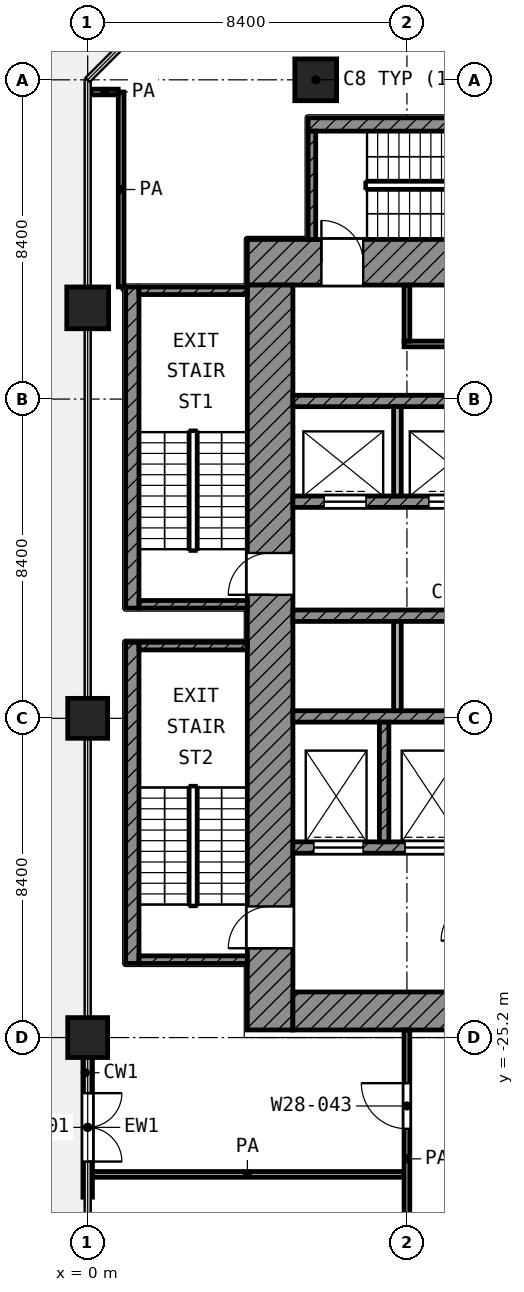
"""IFC4 building model, lengths in metres.
Left out: names, types, materials, properties, quantities, classifications, styles, units other than length and angle.
Written with IfcOpenShell. Run it as: python <this file> out.ifc"""

import sys

from ifc_helpers import new_model, si_unit, direction, frame, frame_2d, origin, origin_2d, place, context, subcontext, project, spatial, rectangle, extrude, element, fill, save


model = new_model("IFC4")
c1 = context("Model", 3, precision=1e-05, world=origin(), true_north=direction((0.0, 1.0)))
c2 = subcontext(c1, "Body", "Model", "MODEL_VIEW")
j1 = project(units=[si_unit("LENGTHUNIT", "METRE"), si_unit("PLANEANGLEUNIT", "RADIAN")], contexts=[c1])
p1 = place(None, origin())
s1 = spatial("IfcSite", under=j1, at=p1, CompositionType="ELEMENT")
p2 = place(p1, origin())
s2 = spatial("IfcBuilding", under=s1, at=p2, CompositionType="ELEMENT")
p3 = place(p2, frame((0.0, 0.0, 124.0)))
s3 = spatial("IfcBuildingStorey", under=s2, at=p3, CompositionType="ELEMENT", Elevation=124.0)
for number, where, z_axis, x_axis in (
    (1, (6.0, 0.0, 0.0), (0.0, 0.0, 1.0), (1.0, 0.0, 0.0)),
    (2, (0.0, -6.0, 0.0), (0.0, 0.0, 1.0), (1.0, 0.0, 0.0)),
):
    element("IfcColumn", number, at=place(p3, frame(where, z_axis=z_axis, x_axis=x_axis)), inside=s3, PredefinedType="COLUMN", context=c2, shape_type="SweptSolid", body=[
        extrude(rectangle(XDim=1.1, YDim=1.1, at=origin_2d()), origin(), (0.0, 0.0, 1.0), 4.2),
    ])
for number, where, z_axis, x_axis in (
    (3, (0.0, -16.8, 0.0), (0.0, 0.0, 1.0), (1.0, 0.0, 0.0)),
    (4, (0.0, -25.2, 0.0), (0.0, 0.0, 1.0), (1.0, 0.0, 0.0)),
):
    element("IfcColumn", number, at=place(p3, frame(where, z_axis=z_axis, x_axis=x_axis)), inside=s3, PredefinedType="COLUMN", context=c2, shape_type="SweptSolid", body=[
        extrude(rectangle(XDim=1.05, YDim=1.05, at=origin_2d()), origin(), (0.0, 0.0, 1.0), 4.2),
    ])
p4 = place(p3, frame((0.0, -25.725, 0.0), z_axis=(0.0, 0.0, 1.0), x_axis=(0.0, -1.0, 0.0)))
e5 = element("IfcWall", 5, at=p4, inside=s3, PredefinedType="SOLIDWALL", context=c2, shape_type="SweptSolid", body=[
    extrude(rectangle(XDim=3.675, YDim=0.25, at=frame_2d((1.837, 0.0))), origin(), (0.0, 0.0, 1.0), 3.48),
])
p5 = place(p4, frame((0.938, 0.0, 0.0)))
e6 = element("IfcOpeningElement", 6, at=p5, cuts=e5, PredefinedType="OPENING", context=c2, shape_type="SweptSolid", body=[
    extrude(rectangle(XDim=1.8, YDim=2.1, at=frame_2d((0.9, 1.05))), frame((0.0, 0.135, 0.0), z_axis=(0.0, -1.0, 0.0), x_axis=(1.0, 0.0, 0.0)), (0.0, 0.0, 1.0), 0.27),
])
p6 = place(p3, frame((4.2, -4.8, 0.0), z_axis=(0.0, 0.0, 1.0), x_axis=(1.0, 0.0, 0.0)))
e7 = element("IfcWall", 7, at=p6, inside=s3, PredefinedType="SHEAR", context=c2, shape_type="SweptSolid", body=[
    extrude(rectangle(XDim=20.8, YDim=1.2, at=frame_2d((10.4, 0.0))), origin(), (0.0, 0.0, 1.0), 3.6),
])
p7 = place(p6, frame((1.95, 0.0, 0.0)))
e8 = element("IfcOpeningElement", 8, at=p7, cuts=e7, PredefinedType="OPENING", context=c2, shape_type="SweptSolid", body=[
    extrude(rectangle(XDim=1.1, YDim=2.1, at=frame_2d((0.55, 1.05))), frame((0.0, 0.61, 0.0), z_axis=(0.0, -1.0, 0.0), x_axis=(1.0, 0.0, 0.0)), (0.0, 0.0, 1.0), 1.22),
])
p8 = place(p6, frame((17.95, 0.0, 0.0)))
e9 = element("IfcOpeningElement", 9, at=p8, cuts=e7, PredefinedType="OPENING", context=c2, shape_type="SweptSolid", body=[
    extrude(rectangle(XDim=1.1, YDim=2.1, at=frame_2d((0.55, 1.05))), frame((0.0, 0.61, 0.0), z_axis=(0.0, -1.0, 0.0), x_axis=(1.0, 0.0, 0.0)), (0.0, 0.0, 1.0), 1.22),
])
p9 = place(p3, frame((4.8, -25.0, 0.0), z_axis=(0.0, 0.0, 1.0), x_axis=(0.0, 1.0, 0.0)))
e10 = element("IfcWall", 10, at=p9, inside=s3, PredefinedType="SHEAR", context=c2, shape_type="SweptSolid", body=[
    extrude(rectangle(XDim=19.6, YDim=1.2, at=frame_2d((9.8, 0.0))), origin(), (0.0, 0.0, 1.0), 3.6),
])
p10 = place(p9, frame((11.45, 0.0, 0.0)))
e11 = element("IfcOpeningElement", 11, at=p10, cuts=e10, PredefinedType="OPENING", context=c2, shape_type="SweptSolid", body=[
    extrude(rectangle(XDim=1.1, YDim=2.1, at=frame_2d((0.55, 1.05))), frame((0.0, 0.61, 0.0), z_axis=(0.0, -1.0, 0.0), x_axis=(1.0, 0.0, 0.0)), (0.0, 0.0, 1.0), 1.22),
])
p11 = place(p9, frame((2.15, 0.0, 0.0)))
e12 = element("IfcOpeningElement", 12, at=p11, cuts=e10, PredefinedType="OPENING", context=c2, shape_type="SweptSolid", body=[
    extrude(rectangle(XDim=1.1, YDim=2.1, at=frame_2d((0.55, 1.05))), frame((0.0, 0.61, 0.0), z_axis=(0.0, -1.0, 0.0), x_axis=(1.0, 0.0, 0.0)), (0.0, 0.0, 1.0), 1.22),
])
p12 = place(p3, frame((5.4, -24.5, 0.0), z_axis=(0.0, 0.0, 1.0), x_axis=(1.0, 0.0, 0.0)))
e13 = element("IfcWall", 13, at=p12, inside=s3, PredefinedType="SHEAR", context=c2, shape_type="SweptSolid", body=[
    extrude(rectangle(XDim=18.6, YDim=1.0, at=frame_2d((9.3, 0.0))), origin(), (0.0, 0.0, 1.0), 3.6),
])
p13 = place(p12, frame((6.3, 0.0, 0.0)))
e14 = element("IfcOpeningElement", 14, at=p13, cuts=e13, PredefinedType="OPENING", context=c2, shape_type="SweptSolid", body=[
    extrude(rectangle(XDim=1.8, YDim=2.1, at=frame_2d((0.9, 1.05))), frame((0.0, 0.51, 0.0), z_axis=(0.0, -1.0, 0.0), x_axis=(1.0, 0.0, 0.0)), (0.0, 0.0, 1.0), 1.02),
])
p14 = place(p3, frame((5.4, -8.45, 0.0), z_axis=(0.0, 0.0, 1.0), x_axis=(1.0, 0.0, 0.0)))
e15 = element("IfcWall", 15, at=p14, inside=s3, PredefinedType="SHEAR", context=c2, shape_type="SweptSolid", body=[
    extrude(rectangle(XDim=16.65, YDim=0.3, at=frame_2d((8.325, 0.0))), origin(), (0.0, 0.0, 1.0), 3.6),
])
p15 = place(p3, frame((5.4, -11.1, 0.0), z_axis=(0.0, 0.0, 1.0), x_axis=(1.0, 0.0, 0.0)))
e16 = element("IfcWall", 16, at=p15, inside=s3, PredefinedType="SHEAR", context=c2, shape_type="SweptSolid", body=[
    extrude(rectangle(XDim=16.65, YDim=0.3, at=frame_2d((8.325, 0.0))), origin(), (0.0, 0.0, 1.0), 3.6),
])
p16 = place(p15, frame((0.825, 0.0, 0.0)))
e17 = element("IfcOpeningElement", 17, at=p16, cuts=e16, PredefinedType="OPENING", context=c2, shape_type="SweptSolid", body=[
    extrude(rectangle(XDim=1.1, YDim=2.1, at=frame_2d((0.55, 1.05))), frame((0.0, 0.16, 0.0), z_axis=(0.0, -1.0, 0.0), x_axis=(1.0, 0.0, 0.0)), (0.0, 0.0, 1.0), 0.32),
])
p17 = place(p15, frame((3.575, 0.0, 0.0)))
e18 = element("IfcOpeningElement", 18, at=p17, cuts=e16, PredefinedType="OPENING", context=c2, shape_type="SweptSolid", body=[
    extrude(rectangle(XDim=1.1, YDim=2.1, at=frame_2d((0.55, 1.05))), frame((0.0, 0.16, 0.0), z_axis=(0.0, -1.0, 0.0), x_axis=(1.0, 0.0, 0.0)), (0.0, 0.0, 1.0), 0.32),
])
p18 = place(p15, frame((6.325, 0.0, 0.0)))
e19 = element("IfcOpeningElement", 19, at=p18, cuts=e16, PredefinedType="OPENING", context=c2, shape_type="SweptSolid", body=[
    extrude(rectangle(XDim=1.1, YDim=2.1, at=frame_2d((0.55, 1.05))), frame((0.0, 0.16, 0.0), z_axis=(0.0, -1.0, 0.0), x_axis=(1.0, 0.0, 0.0)), (0.0, 0.0, 1.0), 0.32),
])
p19 = place(p15, frame((9.075, 0.0, 0.0)))
e20 = element("IfcOpeningElement", 20, at=p19, cuts=e16, PredefinedType="OPENING", context=c2, shape_type="SweptSolid", body=[
    extrude(rectangle(XDim=1.1, YDim=2.1, at=frame_2d((0.55, 1.05))), frame((0.0, 0.16, 0.0), z_axis=(0.0, -1.0, 0.0), x_axis=(1.0, 0.0, 0.0)), (0.0, 0.0, 1.0), 0.32),
])
for number, where, z_axis, x_axis in (
    (21, (5.4, -14.1, 0.0), (0.0, 0.0, 1.0), (1.0, 0.0, 0.0)),
    (22, (5.4, -16.75, 0.0), (0.0, 0.0, 1.0), (1.0, 0.0, 0.0)),
):
    element("IfcWall", number, at=place(p3, frame(where, z_axis=z_axis, x_axis=x_axis)), inside=s3, PredefinedType="SHEAR", context=c2, shape_type="SweptSolid", body=[
        extrude(rectangle(XDim=16.65, YDim=0.3, at=frame_2d((8.325, 0.0))), origin(), (0.0, 0.0, 1.0), 3.6),
    ])
p20 = place(p3, frame((5.4, -20.2, 0.0), z_axis=(0.0, 0.0, 1.0), x_axis=(1.0, 0.0, 0.0)))
e23 = element("IfcWall", 23, at=p20, inside=s3, PredefinedType="SHEAR", context=c2, shape_type="SweptSolid", body=[
    extrude(rectangle(XDim=14.65, YDim=0.3, at=frame_2d((7.325, 0.0))), origin(), (0.0, 0.0, 1.0), 3.6),
])
p21 = place(p20, frame((10.55, 0.0, 0.0)))
e24 = element("IfcOpeningElement", 24, at=p21, cuts=e23, PredefinedType="OPENING", context=c2, shape_type="SweptSolid", body=[
    extrude(rectangle(XDim=1.3, YDim=2.1, at=frame_2d((0.65, 1.05))), frame((0.0, 0.16, 0.0), z_axis=(0.0, -1.0, 0.0), x_axis=(1.0, 0.0, 0.0)), (0.0, 0.0, 1.0), 0.32),
])
p22 = place(p20, frame((12.95, 0.0, 0.0)))
e25 = element("IfcOpeningElement", 25, at=p22, cuts=e23, PredefinedType="OPENING", context=c2, shape_type="SweptSolid", body=[
    extrude(rectangle(XDim=1.3, YDim=2.1, at=frame_2d((0.65, 1.05))), frame((0.0, 0.16, 0.0), z_axis=(0.0, -1.0, 0.0), x_axis=(1.0, 0.0, 0.0)), (0.0, 0.0, 1.0), 0.32),
])
p23 = place(p20, frame((0.55, 0.0, 0.0)))
e26 = element("IfcOpeningElement", 26, at=p23, cuts=e23, PredefinedType="OPENING", context=c2, shape_type="SweptSolid", body=[
    extrude(rectangle(XDim=1.3, YDim=2.1, at=frame_2d((0.65, 1.05))), frame((0.0, 0.16, 0.0), z_axis=(0.0, -1.0, 0.0), x_axis=(1.0, 0.0, 0.0)), (0.0, 0.0, 1.0), 0.32),
])
p24 = place(p20, frame((2.95, 0.0, 0.0)))
e27 = element("IfcOpeningElement", 27, at=p24, cuts=e23, PredefinedType="OPENING", context=c2, shape_type="SweptSolid", body=[
    extrude(rectangle(XDim=1.3, YDim=2.1, at=frame_2d((0.65, 1.05))), frame((0.0, 0.16, 0.0), z_axis=(0.0, -1.0, 0.0), x_axis=(1.0, 0.0, 0.0)), (0.0, 0.0, 1.0), 0.32),
])
p25 = place(p20, frame((7.15, 0.0, 0.0)))
e28 = element("IfcOpeningElement", 28, at=p25, cuts=e23, PredefinedType="OPENING", context=c2, shape_type="SweptSolid", body=[
    extrude(rectangle(XDim=0.9, YDim=2.1, at=frame_2d((0.45, 1.05))), frame((0.0, 0.16, 0.0), z_axis=(0.0, -1.0, 0.0), x_axis=(1.0, 0.0, 0.0)), (0.0, 0.0, 1.0), 0.32),
])
p26 = place(p3, frame((7.8, -20.05, 0.0), z_axis=(0.0, 0.0, 1.0), x_axis=(0.0, 1.0, 0.0)))
e29 = element("IfcWall", 29, at=p26, inside=s3, PredefinedType="SHEAR", context=c2, shape_type="SweptSolid", body=[
    extrude(rectangle(XDim=3.15, YDim=0.25, at=frame_2d((1.575, 0.0))), origin(), (0.0, 0.0, 1.0), 3.6),
])
p27 = place(p3, frame((8.15, -10.95, 0.0), z_axis=(0.0, 0.0, 1.0), x_axis=(0.0, 1.0, 0.0)))
e30 = element("IfcWall", 30, at=p27, inside=s3, PredefinedType="PARTITIONING", context=c2, shape_type="SweptSolid", body=[
    extrude(rectangle(XDim=2.35, YDim=0.2, at=frame_2d((1.175, 0.0))), origin(), (0.0, 0.0, 1.0), 3.6),
])
p28 = place(p3, frame((8.15, -16.6, 0.0), z_axis=(0.0, 0.0, 1.0), x_axis=(0.0, 1.0, 0.0)))
e31 = element("IfcWall", 31, at=p28, inside=s3, PredefinedType="PARTITIONING", context=c2, shape_type="SweptSolid", body=[
    extrude(rectangle(XDim=2.35, YDim=0.2, at=frame_2d((1.175, 0.0))), origin(), (0.0, 0.0, 1.0), 3.6),
])
p29 = place(p3, frame((8.325, -6.95, 0.0), z_axis=(0.0, 0.0, 1.0), x_axis=(1.0, 0.0, 0.0)))
e32 = element("IfcWall", 32, at=p29, inside=s3, PredefinedType="PARTITIONING", context=c2, shape_type="SweptSolid", body=[
    extrude(rectangle(XDim=12.75, YDim=0.15, at=frame_2d((6.375, 0.0))), origin(), (0.0, 0.0, 1.0), 3.6),
])
p30 = place(p29, frame((1.725, 0.0, 0.0)))
e33 = element("IfcOpeningElement", 33, at=p30, cuts=e32, PredefinedType="OPENING", context=c2, shape_type="SweptSolid", body=[
    extrude(rectangle(XDim=0.9, YDim=2.1, at=frame_2d((0.45, 1.05))), frame((0.0, 0.085, 0.0), z_axis=(0.0, -1.0, 0.0), x_axis=(1.0, 0.0, 0.0)), (0.0, 0.0, 1.0), 0.17),
])
p31 = place(p29, frame((5.925, 0.0, 0.0)))
e34 = element("IfcOpeningElement", 34, at=p31, cuts=e32, PredefinedType="OPENING", context=c2, shape_type="SweptSolid", body=[
    extrude(rectangle(XDim=0.9, YDim=2.1, at=frame_2d((0.45, 1.05))), frame((0.0, 0.085, 0.0), z_axis=(0.0, -1.0, 0.0), x_axis=(1.0, 0.0, 0.0)), (0.0, 0.0, 1.0), 0.17),
])
p32 = place(p29, frame((10.125, 0.0, 0.0)))
e35 = element("IfcOpeningElement", 35, at=p32, cuts=e32, PredefinedType="OPENING", context=c2, shape_type="SweptSolid", body=[
    extrude(rectangle(XDim=0.9, YDim=2.1, at=frame_2d((0.45, 1.05))), frame((0.0, 0.085, 0.0), z_axis=(0.0, -1.0, 0.0), x_axis=(1.0, 0.0, 0.0)), (0.0, 0.0, 1.0), 0.17),
])
p33 = place(p3, frame((8.4, -6.875, 0.0), z_axis=(0.0, 0.0, 1.0), x_axis=(0.0, 1.0, 0.0)))
e36 = element("IfcWall", 36, at=p33, inside=s3, PredefinedType="PARTITIONING", context=c2, shape_type="SweptSolid", body=[
    extrude(rectangle(XDim=1.475, YDim=0.15, at=frame_2d((0.738, 0.0))), origin(), (0.0, 0.0, 1.0), 3.6),
])
p34 = place(p3, frame((1.175, -13.9, 0.0), z_axis=(0.0, 0.0, 1.0), x_axis=(0.0, 1.0, 0.0)))
e37 = element("IfcWall", 37, at=p34, inside=s3, PredefinedType="SHEAR", context=c2, shape_type="SweptSolid", body=[
    extrude(rectangle(XDim=8.45, YDim=0.35, at=frame_2d((4.225, 0.0))), origin(), (0.0, 0.0, 1.0), 3.6),
])
for number, where, z_axis, x_axis in (
    (38, (1.35, -5.55, 0.0), (0.0, 0.0, 1.0), (1.0, 0.0, 0.0)),
    (39, (1.35, -13.8, 0.0), (0.0, 0.0, 1.0), (1.0, 0.0, 0.0)),
):
    element("IfcWall", number, at=place(p3, frame(where, z_axis=z_axis, x_axis=x_axis)), inside=s3, PredefinedType="SHEAR", context=c2, shape_type="SweptSolid", body=[
        extrude(rectangle(XDim=2.85, YDim=0.2, at=frame_2d((1.425, 0.0))), origin(), (0.0, 0.0, 1.0), 3.6),
    ])
p35 = place(p3, frame((1.175, -23.25, 0.0), z_axis=(0.0, 0.0, 1.0), x_axis=(0.0, 1.0, 0.0)))
e40 = element("IfcWall", 40, at=p35, inside=s3, PredefinedType="SHEAR", context=c2, shape_type="SweptSolid", body=[
    extrude(rectangle(XDim=8.45, YDim=0.35, at=frame_2d((4.225, 0.0))), origin(), (0.0, 0.0, 1.0), 3.6),
])
for number, where, z_axis, x_axis in (
    (41, (1.35, -14.9, 0.0), (0.0, 0.0, 1.0), (1.0, 0.0, 0.0)),
    (42, (1.35, -23.15, 0.0), (0.0, 0.0, 1.0), (1.0, 0.0, 0.0)),
):
    element("IfcWall", number, at=place(p3, frame(where, z_axis=z_axis, x_axis=x_axis)), inside=s3, PredefinedType="SHEAR", context=c2, shape_type="SweptSolid", body=[
        extrude(rectangle(XDim=2.85, YDim=0.2, at=frame_2d((1.425, 0.0))), origin(), (0.0, 0.0, 1.0), 3.6),
    ])
p36 = place(p3, frame((5.8, -1.175, 0.0), z_axis=(0.0, 0.0, 1.0), x_axis=(1.0, 0.0, 0.0)))
e43 = element("IfcWall", 43, at=p36, inside=s3, PredefinedType="SHEAR", context=c2, shape_type="SweptSolid", body=[
    extrude(rectangle(XDim=8.45, YDim=0.35, at=frame_2d((4.225, 0.0))), origin(), (0.0, 0.0, 1.0), 3.6),
])
p37 = place(p3, frame((5.9, -4.2, 0.0), z_axis=(0.0, 0.0, 1.0), x_axis=(0.0, 1.0, 0.0)))
e44 = element("IfcWall", 44, at=p37, inside=s3, PredefinedType="SHEAR", context=c2, shape_type="SweptSolid", body=[
    extrude(rectangle(XDim=2.85, YDim=0.2, at=frame_2d((1.425, 0.0))), origin(), (0.0, 0.0, 1.0), 3.6),
])
p38 = place(p3, frame((0.08, -28.8, 0.0), z_axis=(0.0, 0.0, 1.0), x_axis=(1.0, 0.0, 0.0)))
e45 = element("IfcWall", 45, at=p38, inside=s3, PredefinedType="PARTITIONING", context=c2, shape_type="SweptSolid", body=[
    extrude(rectangle(XDim=8.245, YDim=0.15, at=frame_2d((4.123, 0.0))), origin(), (0.0, 0.0, 1.0), 3.6),
])
p39 = place(p3, frame((0.08, -0.32, 0.0), z_axis=(0.0, 0.0, 1.0), x_axis=(1.0, 0.0, 0.0)))
e46 = element("IfcWall", 46, at=p39, inside=s3, PredefinedType="PARTITIONING", context=c2, shape_type="SweptSolid", body=[
    extrude(rectangle(XDim=0.723, YDim=0.15, at=frame_2d((0.361, 0.0))), origin(), (0.0, 0.0, 1.0), 3.6),
])
p40 = place(p3, frame((0.88, -5.45, 0.0), z_axis=(0.0, 0.0, 1.0), x_axis=(0.0, 1.0, 0.0)))
e47 = element("IfcWall", 47, at=p40, inside=s3, PredefinedType="PARTITIONING", context=c2, shape_type="SweptSolid", body=[
    extrude(rectangle(XDim=5.128, YDim=0.15, at=frame_2d((2.564, 0.0))), origin(), (0.0, 0.0, 1.0), 3.6),
])
p41 = place(p3, frame((8.4, -31.782, 0.0), z_axis=(0.0, 0.0, 1.0), x_axis=(0.0, 1.0, 0.0)))
e48 = element("IfcWall", 48, at=p41, inside=s3, PredefinedType="PARTITIONING", context=c2, shape_type="SweptSolid", body=[
    extrude(rectangle(XDim=6.782, YDim=0.15, at=frame_2d((3.391, 0.0))), origin(), (0.0, 0.0, 1.0), 3.6),
])
p42 = place(p41, frame((4.182, 0.0, 0.0)))
e49 = element("IfcOpeningElement", 49, at=p42, cuts=e48, PredefinedType="OPENING", context=c2, shape_type="SweptSolid", body=[
    extrude(rectangle(XDim=1.2, YDim=2.1, at=frame_2d((0.6, 1.05))), frame((0.0, 0.085, 0.0), z_axis=(0.0, -1.0, 0.0), x_axis=(1.0, 0.0, 0.0)), (0.0, 0.0, 1.0), 0.17),
])
p43 = place(p5, origin())
e50 = element("IfcDoor", 50, at=p43, inside=s3, OperationType="DOUBLE_DOOR_SINGLE_SWING", PredefinedType="DOOR", context=c2, shape_type="SweptSolid", body=[
    extrude(rectangle(XDim=1.8, YDim=2.1, at=frame_2d((0.9, 1.05))), frame((0.0, 0.025, 0.0), z_axis=(0.0, -1.0, 0.0), x_axis=(1.0, 0.0, 0.0)), (0.0, 0.0, 1.0), 0.05),
])
fill(e6, e50)
p44 = place(p16, origin())
e51 = element("IfcDoor", 51, at=p44, inside=s3, OperationType="DOUBLE_DOOR_SLIDING", PredefinedType="DOOR", context=c2, shape_type="SweptSolid", body=[
    extrude(rectangle(XDim=1.1, YDim=2.1, at=frame_2d((0.55, 1.05))), frame((0.0, 0.025, 0.0), z_axis=(0.0, -1.0, 0.0), x_axis=(1.0, 0.0, 0.0)), (0.0, 0.0, 1.0), 0.05),
])
fill(e17, e51)
p45 = place(p17, origin())
e52 = element("IfcDoor", 52, at=p45, inside=s3, OperationType="DOUBLE_DOOR_SLIDING", PredefinedType="DOOR", context=c2, shape_type="SweptSolid", body=[
    extrude(rectangle(XDim=1.1, YDim=2.1, at=frame_2d((0.55, 1.05))), frame((0.0, 0.025, 0.0), z_axis=(0.0, -1.0, 0.0), x_axis=(1.0, 0.0, 0.0)), (0.0, 0.0, 1.0), 0.05),
])
fill(e18, e52)
p46 = place(p23, origin())
e53 = element("IfcDoor", 53, at=p46, inside=s3, OperationType="DOUBLE_DOOR_SLIDING", PredefinedType="DOOR", context=c2, shape_type="SweptSolid", body=[
    extrude(rectangle(XDim=1.3, YDim=2.1, at=frame_2d((0.65, 1.05))), frame((0.0, 0.025, 0.0), z_axis=(0.0, -1.0, 0.0), x_axis=(1.0, 0.0, 0.0)), (0.0, 0.0, 1.0), 0.05),
])
fill(e26, e53)
p47 = place(p24, origin())
e54 = element("IfcDoor", 54, at=p47, inside=s3, OperationType="DOUBLE_DOOR_SLIDING", PredefinedType="DOOR", context=c2, shape_type="SweptSolid", body=[
    extrude(rectangle(XDim=1.3, YDim=2.1, at=frame_2d((0.65, 1.05))), frame((0.0, 0.025, 0.0), z_axis=(0.0, -1.0, 0.0), x_axis=(1.0, 0.0, 0.0)), (0.0, 0.0, 1.0), 0.05),
])
fill(e27, e54)
p48 = place(p10, origin())
e55 = element("IfcDoor", 55, at=p48, inside=s3, OperationType="SINGLE_SWING_LEFT", PredefinedType="DOOR", context=c2, shape_type="SweptSolid", body=[
    extrude(rectangle(XDim=1.1, YDim=2.1, at=frame_2d((0.55, 1.05))), frame((0.0, 0.025, 0.0), z_axis=(0.0, -1.0, 0.0), x_axis=(1.0, 0.0, 0.0)), (0.0, 0.0, 1.0), 0.05),
])
fill(e11, e55)
p49 = place(p11, origin())
e56 = element("IfcDoor", 56, at=p49, inside=s3, OperationType="SINGLE_SWING_LEFT", PredefinedType="DOOR", context=c2, shape_type="SweptSolid", body=[
    extrude(rectangle(XDim=1.1, YDim=2.1, at=frame_2d((0.55, 1.05))), frame((0.0, 0.025, 0.0), z_axis=(0.0, -1.0, 0.0), x_axis=(1.0, 0.0, 0.0)), (0.0, 0.0, 1.0), 0.05),
])
fill(e12, e56)
p50 = place(p7, origin())
e57 = element("IfcDoor", 57, at=p50, inside=s3, OperationType="SINGLE_SWING_LEFT", PredefinedType="DOOR", context=c2, shape_type="SweptSolid", body=[
    extrude(rectangle(XDim=1.1, YDim=2.1, at=frame_2d((0.55, 1.05))), frame((0.0, 0.025, 0.0), z_axis=(0.0, -1.0, 0.0), x_axis=(1.0, 0.0, 0.0)), (0.0, 0.0, 1.0), 0.05),
])
fill(e8, e57)
p51 = place(p42, origin())
e58 = element("IfcDoor", 58, at=p51, inside=s3, OperationType="SINGLE_SWING_RIGHT", PredefinedType="DOOR", context=c2, shape_type="SweptSolid", body=[
    extrude(rectangle(XDim=1.2, YDim=2.1, at=frame_2d((0.6, 1.05))), frame((0.0, 0.025, 0.0), z_axis=(0.0, -1.0, 0.0), x_axis=(1.0, 0.0, 0.0)), (0.0, 0.0, 1.0), 0.05),
])
fill(e49, e58)
save(model, sys.argv[1])
